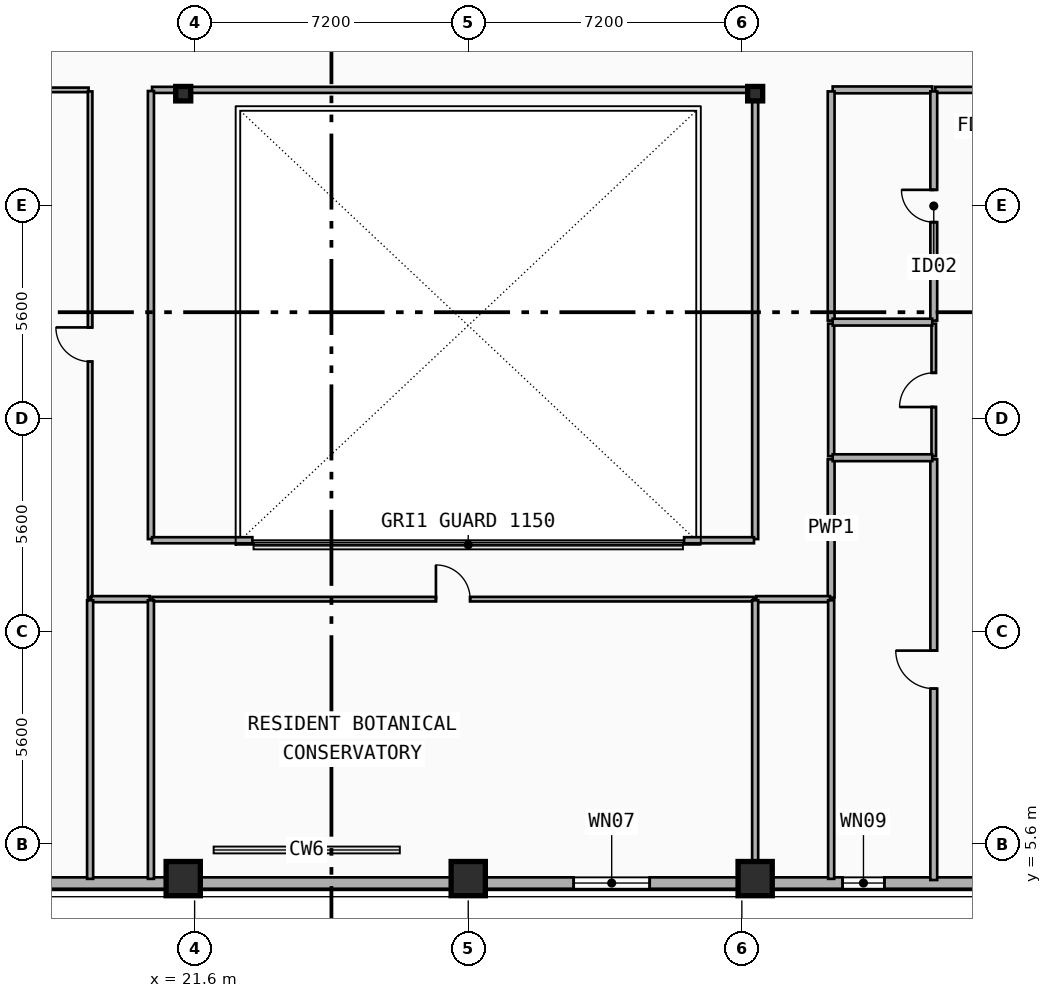
"""IFC4 building model, lengths in metres.
Left out: names, types, materials, properties, quantities, classifications, styles, units other than length and angle.
Written with IfcOpenShell. Run it as: python <this file> out.ifc"""

import sys

from ifc_helpers import new_model, si_unit, direction, frame, frame_2d, origin, origin_2d, place, context, subcontext, project, spatial, rectangle, i_section, extrude, element, fill, save


model = new_model("IFC4")
c1 = context("Model", 3, precision=1e-05, world=origin(), true_north=direction((0.0, 1.0)))
c2 = subcontext(c1, "Body", "Model", "MODEL_VIEW")
j1 = project(units=[si_unit("LENGTHUNIT", "METRE"), si_unit("PLANEANGLEUNIT", "RADIAN")], contexts=[c1])
p1 = place(None, origin())
s1 = spatial("IfcSite", under=j1, at=p1, CompositionType="ELEMENT")
p2 = place(p1, origin())
s2 = spatial("IfcBuilding", under=s1, at=p2, CompositionType="ELEMENT")
p3 = place(p2, frame((0.0, 0.0, 236.4)))
s3 = spatial("IfcBuildingStorey", under=s2, at=p3, CompositionType="ELEMENT", Elevation=236.4)
for number, where, z_axis, x_axis in (
    (1, (21.3, 25.35, 0.0), (0.0, 0.0, 1.0), (1.0, 0.0, 0.0)),
    (2, (36.35, 25.35, 0.0), (0.0, 0.0, 1.0), (1.0, 0.0, 0.0)),
):
    element("IfcColumn", number, at=place(p3, frame(where, z_axis=z_axis, x_axis=x_axis)), inside=s3, PredefinedType="COLUMN", context=c2, shape_type="SweptSolid", body=[
        extrude(i_section(OverallWidth=0.395, OverallDepth=0.38, WebThickness=0.019, FlangeThickness=0.03, FilletRadius=0.015, at=origin_2d()), origin(), (0.0, 0.0, 1.0), 3.6),
    ])
for number, where, z_axis, x_axis in (
    (3, (21.3, 4.805, 0.0), (0.0, -0.09, 0.996), (1.0, 0.0, 0.0)),
    (4, (28.8, 4.805, 0.0), (0.0, -0.09, 0.996), (1.0, 0.0, 0.0)),
    (5, (36.35, 4.805, 0.0), (0.0, -0.09, 0.996), (1.0, 0.0, 0.0)),
):
    element("IfcColumn", number, at=place(p3, frame(where, z_axis=z_axis, x_axis=x_axis)), inside=s3, PredefinedType="COLUMN", context=c2, shape_type="SweptSolid", body=[
        extrude(rectangle(XDim=0.9, YDim=0.9, at=origin_2d()), origin(), (0.0, 0.0, 1.0), 3.615),
    ])
p4 = place(p3, frame((48.0, 4.58, 0.0), z_axis=(0.0, 0.0, 1.0), x_axis=(-1.0, 0.0, 0.0)))
e6 = element("IfcWall", 6, at=p4, inside=s3, PredefinedType="SOLIDWALL", context=c2, shape_type="SweptSolid", body=[
    extrude(rectangle(XDim=38.4, YDim=0.3, at=frame_2d((19.2, 0.0))), origin(), (0.0, 0.0, 1.0), 3.0),
])
p5 = place(p4, frame((33.795, 0.0, 1.22)))
e7 = element("IfcOpeningElement", 7, at=p5, cuts=e6, PredefinedType="OPENING", context=c2, shape_type="SweptSolid", body=[
    extrude(rectangle(XDim=1.2, YDim=1.5, at=frame_2d((0.6, 0.75))), frame((0.0, 0.16, 0.0), z_axis=(0.0, -1.0, 0.0), x_axis=(1.0, 0.0, 0.0)), (0.0, 0.0, 1.0), 0.32),
])
p6 = place(p4, frame((14.425, 0.0, 0.62)))
e8 = element("IfcOpeningElement", 8, at=p6, cuts=e6, PredefinedType="OPENING", context=c2, shape_type="SweptSolid", body=[
    extrude(rectangle(XDim=2.0, YDim=2.2, at=frame_2d((1.0, 1.1))), frame((0.0, 0.16, 0.0), z_axis=(0.0, -1.0, 0.0), x_axis=(1.0, 0.0, 0.0)), (0.0, 0.0, 1.0), 0.32),
])
p7 = place(p4, frame((3.691, 0.0, 0.48)))
e9 = element("IfcOpeningElement", 9, at=p7, cuts=e6, PredefinedType="OPENING", context=c2, shape_type="SweptSolid", body=[
    extrude(rectangle(XDim=1.2, YDim=1.5, at=frame_2d((0.6, 0.75))), frame((0.0, 0.16, 0.0), z_axis=(0.0, -1.0, 0.0), x_axis=(1.0, 0.0, 0.0)), (0.0, 0.0, 1.0), 0.32),
])
p8 = place(p4, frame((8.25, 0.0, 1.68)))
e10 = element("IfcOpeningElement", 10, at=p8, cuts=e6, PredefinedType="OPENING", context=c2, shape_type="SweptSolid", body=[
    extrude(rectangle(XDim=1.1, YDim=1.05, at=frame_2d((0.55, 0.525))), frame((0.0, 0.16, 0.0), z_axis=(0.0, -1.0, 0.0), x_axis=(1.0, 0.0, 0.0)), (0.0, 0.0, 1.0), 0.32),
])
p9 = place(p4, frame((0.357, 0.0, 0.75)))
e11 = element("IfcOpeningElement", 11, at=p9, cuts=e6, PredefinedType="OPENING", context=c2, shape_type="SweptSolid", body=[
    extrude(rectangle(XDim=1.4, YDim=1.8, at=frame_2d((0.7, 0.9))), frame((0.0, 0.16, 0.0), z_axis=(0.0, -1.0, 0.0), x_axis=(1.0, 0.0, 0.0)), (0.0, 0.0, 1.0), 0.32),
])
p10 = place(p3, frame((5.66, 25.45, 0.0), z_axis=(0.0, 0.0, 1.0), x_axis=(1.0, 0.0, 0.0)))
e12 = element("IfcWall", 12, at=p10, inside=s3, PredefinedType="PARTITIONING", context=c2, shape_type="SweptSolid", body=[
    extrude(rectangle(XDim=13.15, YDim=0.12, at=frame_2d((6.575, 0.0))), origin(), (0.0, 0.0, 1.0), 2.62),
])
p11 = place(p10, frame((0.639, 0.0, 0.0)))
e13 = element("IfcOpeningElement", 13, at=p11, cuts=e12, PredefinedType="OPENING", context=c2, shape_type="SweptSolid", body=[
    extrude(rectangle(XDim=0.9, YDim=2.1, at=frame_2d((0.45, 1.05))), frame((0.0, 0.07, 0.0), z_axis=(0.0, -1.0, 0.0), x_axis=(1.0, 0.0, 0.0)), (0.0, 0.0, 1.0), 0.14),
])
p12 = place(p3, frame((41.09, 25.45, 0.0), z_axis=(0.0, 0.0, 1.0), x_axis=(1.0, 0.0, 0.0)))
e14 = element("IfcWall", 14, at=p12, inside=s3, PredefinedType="PARTITIONING", context=c2, shape_type="SweptSolid", body=[
    extrude(rectangle(XDim=3.479, YDim=0.16, at=frame_2d((1.74, 0.0))), origin(), (0.0, 0.0, 1.0), 3.34),
])
p13 = place(p12, frame((1.24, 0.0, 0.0)))
e15 = element("IfcOpeningElement", 15, at=p13, cuts=e14, PredefinedType="OPENING", context=c2, shape_type="SweptSolid", body=[
    extrude(rectangle(XDim=1.0, YDim=2.15, at=frame_2d((0.5, 1.075))), frame((0.0, 0.09, 0.0), z_axis=(0.0, -1.0, 0.0), x_axis=(1.0, 0.0, 0.0)), (0.0, 0.0, 1.0), 0.18),
])
p14 = place(p3, frame((38.39, 25.45, 0.0), z_axis=(0.0, 0.0, 1.0), x_axis=(1.0, 0.0, 0.0)))
e16 = element("IfcWall", 16, at=p14, inside=s3, PredefinedType="PLUMBINGWALL", context=c2, shape_type="SweptSolid", body=[
    extrude(rectangle(XDim=2.62, YDim=0.18, at=frame_2d((1.31, 0.0))), origin(), (0.0, 0.0, 1.0), 3.34),
])
p15 = place(p3, frame((18.85, 12.09, 0.0), z_axis=(0.0, 0.0, 1.0), x_axis=(0.0, 1.0, 0.0)))
e17 = element("IfcWall", 17, at=p15, inside=s3, PredefinedType="PARTITIONING", context=c2, shape_type="SweptSolid", body=[
    extrude(rectangle(XDim=13.32, YDim=0.12, at=frame_2d((6.66, 0.0))), origin(), (0.0, 0.0, 1.0), 2.88),
])
p16 = place(p15, frame((6.21, 0.0, 0.0)))
e18 = element("IfcOpeningElement", 18, at=p16, cuts=e17, PredefinedType="OPENING", context=c2, shape_type="SweptSolid", body=[
    extrude(rectangle(XDim=0.9, YDim=2.1, at=frame_2d((0.45, 1.05))), frame((0.0, 0.07, 0.0), z_axis=(0.0, -1.0, 0.0), x_axis=(1.0, 0.0, 0.0)), (0.0, 0.0, 1.0), 0.14),
])
p17 = place(p3, frame((38.35, 12.09, 0.0), z_axis=(0.0, 0.0, 1.0), x_axis=(0.0, 1.0, 0.0)))
e19 = element("IfcWall", 19, at=p17, inside=s3, PredefinedType="PLUMBINGWALL", context=c2, shape_type="SweptSolid", body=[
    extrude(rectangle(XDim=3.641, YDim=0.18, at=frame_2d((1.82, 0.0))), origin(), (0.0, 0.0, 1.0), 2.88),
])
p18 = place(p3, frame((38.35, 15.811, 0.0), z_axis=(0.0, 0.0, 1.0), x_axis=(0.0, 1.0, 0.0)))
e20 = element("IfcWall", 20, at=p18, inside=s3, PredefinedType="PARTITIONING", context=c2, shape_type="SweptSolid", body=[
    extrude(rectangle(XDim=3.488, YDim=0.16, at=frame_2d((1.744, 0.0))), origin(), (0.0, 0.0, 1.0), 2.88),
])
p19 = place(p3, frame((38.35, 19.379, 0.0), z_axis=(0.0, 0.0, 1.0), x_axis=(0.0, 1.0, 0.0)))
e21 = element("IfcWall", 21, at=p19, inside=s3, PredefinedType="PLUMBINGWALL", context=c2, shape_type="SweptSolid", body=[
    extrude(rectangle(XDim=6.031, YDim=0.18, at=frame_2d((3.016, 0.0))), origin(), (0.0, 0.0, 1.0), 2.88),
])
p20 = place(p3, frame((20.49, 12.05, 0.0), z_axis=(0.0, 0.0, 1.0), x_axis=(1.0, 0.0, 0.0)))
e22 = element("IfcWall", 22, at=p20, inside=s3, PredefinedType="PARTITIONING", context=c2, shape_type="SweptSolid", body=[
    extrude(rectangle(XDim=15.82, YDim=0.12, at=frame_2d((7.91, 0.0))), origin(), (0.0, 0.0, 1.0), 2.62),
])
p21 = place(p20, frame((7.46, 0.0, 0.0)))
e23 = element("IfcOpeningElement", 23, at=p21, cuts=e22, PredefinedType="OPENING", context=c2, shape_type="SweptSolid", body=[
    extrude(rectangle(XDim=0.9, YDim=2.1, at=frame_2d((0.45, 1.05))), frame((0.0, 0.07, 0.0), z_axis=(0.0, -1.0, 0.0), x_axis=(1.0, 0.0, 0.0)), (0.0, 0.0, 1.0), 0.14),
])
p22 = place(p3, frame((41.05, 4.66, 0.0), z_axis=(0.0, 0.0, 1.0), x_axis=(0.0, 1.0, 0.0)))
e24 = element("IfcWall", 24, at=p22, inside=s3, PredefinedType="PLUMBINGWALL", context=c2, shape_type="SweptSolid", body=[
    extrude(rectangle(XDim=11.071, YDim=0.18, at=frame_2d((5.536, 0.0))), origin(), (0.0, 0.0, 1.0), 2.88),
])
p23 = place(p22, frame((5.035, 0.0, 0.0)))
e25 = element("IfcOpeningElement", 25, at=p23, cuts=e24, PredefinedType="OPENING", context=c2, shape_type="SweptSolid", body=[
    extrude(rectangle(XDim=1.0, YDim=2.15, at=frame_2d((0.5, 1.075))), frame((0.0, 0.1, 0.0), z_axis=(0.0, -1.0, 0.0), x_axis=(1.0, 0.0, 0.0)), (0.0, 0.0, 1.0), 0.2),
])
p24 = place(p3, frame((41.05, 15.811, 0.0), z_axis=(0.0, 0.0, 1.0), x_axis=(0.0, 1.0, 0.0)))
e26 = element("IfcWall", 26, at=p24, inside=s3, PredefinedType="PARTITIONING", context=c2, shape_type="SweptSolid", body=[
    extrude(rectangle(XDim=3.488, YDim=0.12, at=frame_2d((1.744, 0.0))), origin(), (0.0, 0.0, 1.0), 2.88),
])
p25 = place(p24, frame((1.294, 0.0, 0.0)))
e27 = element("IfcOpeningElement", 27, at=p25, cuts=e26, PredefinedType="OPENING", context=c2, shape_type="SweptSolid", body=[
    extrude(rectangle(XDim=0.9, YDim=2.1, at=frame_2d((0.45, 1.05))), frame((0.0, 0.07, 0.0), z_axis=(0.0, -1.0, 0.0), x_axis=(1.0, 0.0, 0.0)), (0.0, 0.0, 1.0), 0.14),
])
p26 = place(p3, frame((41.05, 19.379, 0.0), z_axis=(0.0, 0.0, 1.0), x_axis=(0.0, 1.0, 0.0)))
e28 = element("IfcWall", 28, at=p26, inside=s3, PredefinedType="PLUMBINGWALL", context=c2, shape_type="SweptSolid", body=[
    extrude(rectangle(XDim=6.031, YDim=0.18, at=frame_2d((3.016, 0.0))), origin(), (0.0, 0.0, 1.0), 2.88),
])
p27 = place(p26, frame((2.591, 0.0, 0.0)))
e29 = element("IfcOpeningElement", 29, at=p27, cuts=e28, PredefinedType="OPENING", context=c2, shape_type="SweptSolid", body=[
    extrude(rectangle(XDim=0.85, YDim=2.1, at=frame_2d((0.425, 1.05))), frame((0.0, 0.1, 0.0), z_axis=(0.0, -1.0, 0.0), x_axis=(1.0, 0.0, 0.0)), (0.0, 0.0, 1.0), 0.2),
])
p28 = place(p3, frame((38.39, 15.771, 0.0), z_axis=(0.0, 0.0, 1.0), x_axis=(1.0, 0.0, 0.0)))
e30 = element("IfcWall", 30, at=p28, inside=s3, PredefinedType="PLUMBINGWALL", context=c2, shape_type="SweptSolid", body=[
    extrude(rectangle(XDim=2.62, YDim=0.18, at=frame_2d((1.31, 0.0))), origin(), (0.0, 0.0, 1.0), 2.88),
])
p29 = place(p3, frame((38.39, 19.339, 0.0), z_axis=(0.0, 0.0, 1.0), x_axis=(1.0, 0.0, 0.0)))
e31 = element("IfcWall", 31, at=p29, inside=s3, PredefinedType="PLUMBINGWALL", context=c2, shape_type="SweptSolid", body=[
    extrude(rectangle(XDim=2.62, YDim=0.18, at=frame_2d((1.31, 0.0))), origin(), (0.0, 0.0, 1.0), 3.01),
])
p30 = place(p3, frame((20.48, 25.45, 0.0), z_axis=(0.0, 0.0, 1.0), x_axis=(1.0, 0.0, 0.0)))
e32 = element("IfcWall", 32, at=p30, inside=s3, PredefinedType="PARTITIONING", context=c2, shape_type="SweptSolid", body=[
    extrude(rectangle(XDim=15.84, YDim=0.16, at=frame_2d((7.92, 0.0))), origin(), (0.0, 0.0, 1.0), 2.62),
])
p31 = place(p3, frame((18.88, 12.05, 0.0), z_axis=(0.0, 0.0, 1.0), x_axis=(1.0, 0.0, 0.0)))
e33 = element("IfcWall", 33, at=p31, inside=s3, PredefinedType="PARTITIONING", context=c2, shape_type="SweptSolid", body=[
    extrude(rectangle(XDim=1.54, YDim=0.16, at=frame_2d((0.77, 0.0))), origin(), (0.0, 0.0, 1.0), 3.01),
])
p32 = place(p3, frame((20.45, 13.63, 0.0), z_axis=(0.0, 0.0, 1.0), x_axis=(0.0, 1.0, 0.0)))
e34 = element("IfcWall", 34, at=p32, inside=s3, PredefinedType="PARTITIONING", context=c2, shape_type="SweptSolid", body=[
    extrude(rectangle(XDim=11.79, YDim=0.16, at=frame_2d((5.895, 0.0))), origin(), (0.0, 0.0, 1.0), 2.88),
])
p33 = place(p3, frame((36.38, 12.05, 0.0), z_axis=(0.0, 0.0, 1.0), x_axis=(1.0, 0.0, 0.0)))
e35 = element("IfcWall", 35, at=p33, inside=s3, PredefinedType="PARTITIONING", context=c2, shape_type="SweptSolid", body=[
    extrude(rectangle(XDim=1.94, YDim=0.16, at=frame_2d((0.97, 0.0))), origin(), (0.0, 0.0, 1.0), 2.62),
])
p34 = place(p3, frame((36.35, 13.63, 0.0), z_axis=(0.0, 0.0, 1.0), x_axis=(0.0, 1.0, 0.0)))
e36 = element("IfcWall", 36, at=p34, inside=s3, PredefinedType="PARTITIONING", context=c2, shape_type="SweptSolid", body=[
    extrude(rectangle(XDim=11.79, YDim=0.16, at=frame_2d((5.895, 0.0))), origin(), (0.0, 0.0, 1.0), 2.62),
])
p35 = place(p3, frame((20.48, 13.6, 0.0), z_axis=(0.0, 0.0, 1.0), x_axis=(1.0, 0.0, 0.0)))
e37 = element("IfcWall", 37, at=p35, inside=s3, PredefinedType="PARTITIONING", context=c2, shape_type="SweptSolid", body=[
    extrude(rectangle(XDim=2.64, YDim=0.16, at=frame_2d((1.32, 0.0))), origin(), (0.0, 0.0, 1.0), 2.62),
])
p36 = place(p3, frame((34.48, 13.6, 0.0), z_axis=(0.0, 0.0, 1.0), x_axis=(1.0, 0.0, 0.0)))
e38 = element("IfcWall", 38, at=p36, inside=s3, PredefinedType="PARTITIONING", context=c2, shape_type="SweptSolid", body=[
    extrude(rectangle(XDim=1.84, YDim=0.16, at=frame_2d((0.92, 0.0))), origin(), (0.0, 0.0, 1.0), 2.62),
])
for number, where, z_axis, x_axis in (
    (39, (18.85, 4.69, 0.0), (0.0, 0.0, 1.0), (0.0, 1.0, 0.0)),
    (40, (20.45, 4.69, 0.0), (0.0, 0.0, 1.0), (0.0, 1.0, 0.0)),
):
    element("IfcWall", number, at=place(p3, frame(where, z_axis=z_axis, x_axis=x_axis)), inside=s3, PredefinedType="PARTITIONING", context=c2, shape_type="SweptSolid", body=[
        extrude(rectangle(XDim=7.33, YDim=0.16, at=frame_2d((3.665, 0.0))), origin(), (0.0, 0.0, 1.0), 2.88),
    ])
p37 = place(p3, frame((36.35, 4.69, 0.0), z_axis=(0.0, 0.0, 1.0), x_axis=(0.0, 1.0, 0.0)))
e41 = element("IfcWall", 41, at=p37, inside=s3, PredefinedType="PARTITIONING", context=c2, shape_type="SweptSolid", body=[
    extrude(rectangle(XDim=7.33, YDim=0.16, at=frame_2d((3.665, 0.0))), origin(), (0.0, 0.0, 1.0), 2.62),
])
p38 = place(p3, frame((38.35, 4.69, 0.0), z_axis=(0.0, 0.0, 1.0), x_axis=(0.0, 1.0, 0.0)))
e42 = element("IfcWall", 42, at=p38, inside=s3, PredefinedType="PARTITIONING", context=c2, shape_type="SweptSolid", body=[
    extrude(rectangle(XDim=7.33, YDim=0.16, at=frame_2d((3.665, 0.0))), origin(), (0.0, 0.0, 1.0), 2.88),
])
p39 = place(p6, origin())
e43 = element("IfcWindow", 43, at=p39, inside=s3, PartitioningType="SINGLE_PANEL", PredefinedType="WINDOW", context=c2, shape_type="SweptSolid", body=[
    extrude(rectangle(XDim=2.0, YDim=2.2, at=frame_2d((1.0, 1.1))), frame((0.0, 0.03, 0.0), z_axis=(0.0, -1.0, 0.0), x_axis=(1.0, 0.0, 0.0)), (0.0, 0.0, 1.0), 0.06),
])
fill(e8, e43)
p40 = place(p8, origin())
e44 = element("IfcWindow", 44, at=p40, inside=s3, PartitioningType="SINGLE_PANEL", PredefinedType="WINDOW", context=c2, shape_type="SweptSolid", body=[
    extrude(rectangle(XDim=1.1, YDim=1.05, at=frame_2d((0.55, 0.525))), frame((0.0, 0.03, 0.0), z_axis=(0.0, -1.0, 0.0), x_axis=(1.0, 0.0, 0.0)), (0.0, 0.0, 1.0), 0.06),
])
fill(e10, e44)
p41 = place(p16, origin())
e45 = element("IfcDoor", 45, at=p41, inside=s3, OperationType="SINGLE_SWING_RIGHT", PredefinedType="DOOR", context=c2, shape_type="SweptSolid", body=[
    extrude(rectangle(XDim=0.9, YDim=2.1, at=frame_2d((0.45, 1.05))), frame((0.0, 0.025, 0.0), z_axis=(0.0, -1.0, 0.0), x_axis=(1.0, 0.0, 0.0)), (0.0, 0.0, 1.0), 0.05),
])
fill(e18, e45)
p42 = place(p21, origin())
e46 = element("IfcDoor", 46, at=p42, inside=s3, OperationType="SINGLE_SWING_LEFT", PredefinedType="DOOR", context=c2, shape_type="SweptSolid", body=[
    extrude(rectangle(XDim=0.9, YDim=2.1, at=frame_2d((0.45, 1.05))), frame((0.0, 0.025, 0.0), z_axis=(0.0, -1.0, 0.0), x_axis=(1.0, 0.0, 0.0)), (0.0, 0.0, 1.0), 0.05),
])
fill(e23, e46)
p43 = place(p23, origin())
e47 = element("IfcDoor", 47, at=p43, inside=s3, OperationType="SINGLE_SWING_RIGHT", PredefinedType="DOOR", context=c2, shape_type="SweptSolid", body=[
    extrude(rectangle(XDim=1.0, YDim=2.15, at=frame_2d((0.5, 1.075))), frame((0.0, 0.025, 0.0), z_axis=(0.0, -1.0, 0.0), x_axis=(1.0, 0.0, 0.0)), (0.0, 0.0, 1.0), 0.05),
])
fill(e25, e47)
p44 = place(p25, origin())
e48 = element("IfcDoor", 48, at=p44, inside=s3, OperationType="SINGLE_SWING_LEFT", PredefinedType="DOOR", context=c2, shape_type="SweptSolid", body=[
    extrude(rectangle(XDim=0.9, YDim=2.1, at=frame_2d((0.45, 1.05))), frame((0.0, 0.025, 0.0), z_axis=(0.0, -1.0, 0.0), x_axis=(1.0, 0.0, 0.0)), (0.0, 0.0, 1.0), 0.05),
])
fill(e27, e48)
p45 = place(p27, origin())
e49 = element("IfcDoor", 49, at=p45, inside=s3, OperationType="SINGLE_SWING_RIGHT", PredefinedType="DOOR", context=c2, shape_type="SweptSolid", body=[
    extrude(rectangle(XDim=0.85, YDim=2.1, at=frame_2d((0.425, 1.05))), frame((0.0, 0.025, 0.0), z_axis=(0.0, -1.0, 0.0), x_axis=(1.0, 0.0, 0.0)), (0.0, 0.0, 1.0), 0.05),
])
fill(e29, e49)
save(model, sys.argv[1])
